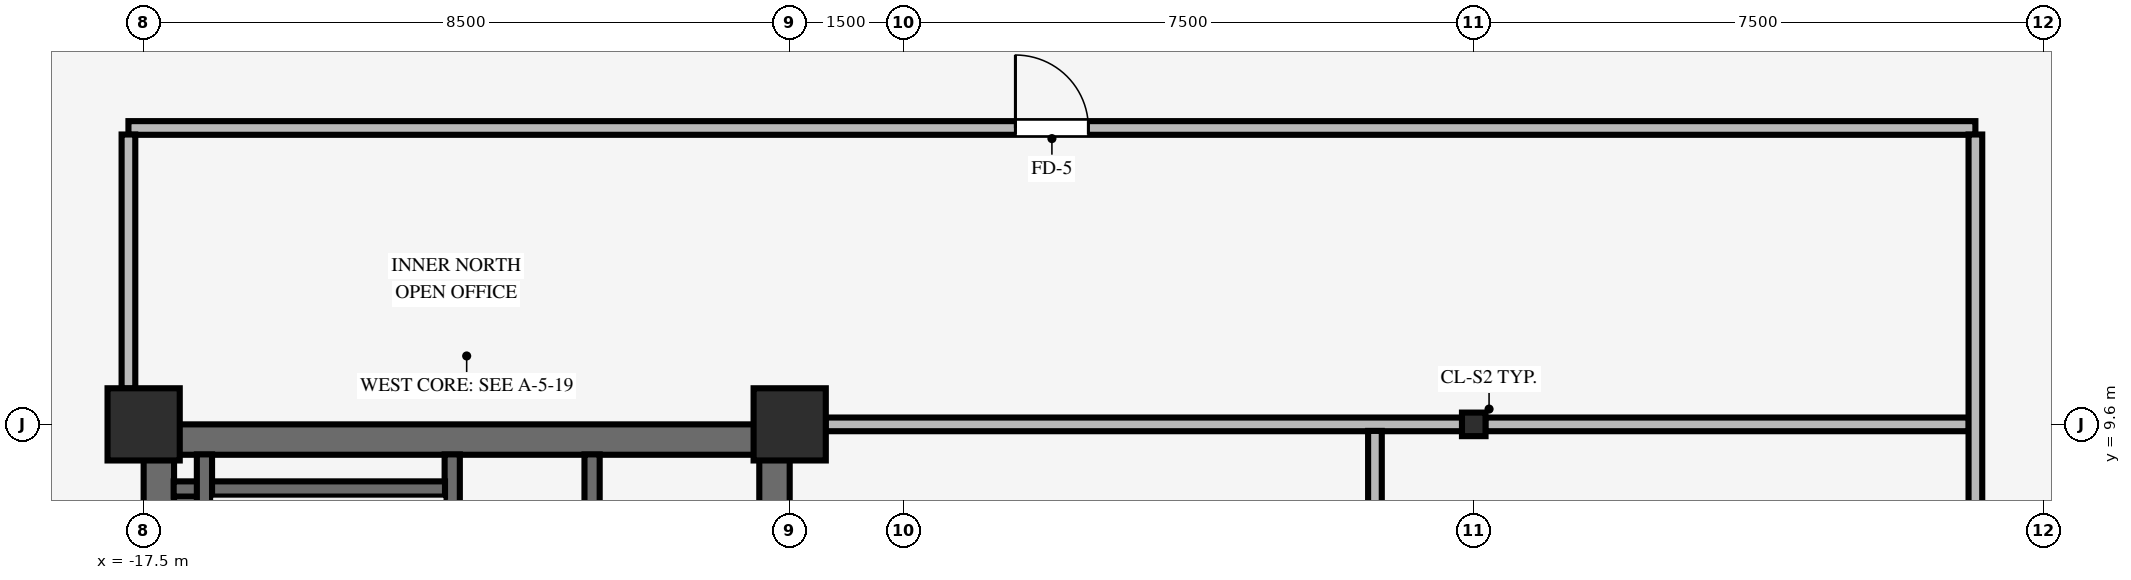
"""IFC4 building model, lengths in metres.
Left out: names, types, materials, properties, quantities, classifications, styles, units other than length and angle.
Written with IfcOpenShell. Run it as: python <this file> out.ifc"""

import sys

from ifc_helpers import new_model, si_unit, direction, frame, frame_2d, origin, origin_2d, place, context, subcontext, project, spatial, rectangle, i_section, extrude, source, transform, mapped, element, fill, save


model = new_model("IFC4")
c1 = context("Model", 3, precision=1e-05, world=origin(), true_north=direction((0.0, 1.0)))
c2 = subcontext(c1, "Body", "Model", "MODEL_VIEW")
j1 = project(units=[si_unit("LENGTHUNIT", "METRE"), si_unit("PLANEANGLEUNIT", "RADIAN")], contexts=[c1])
p1 = place(None, origin())
s1 = spatial("IfcSite", under=j1, at=p1, CompositionType="ELEMENT")
p2 = place(p1, origin())
s2 = spatial("IfcBuilding", under=s1, at=p2, CompositionType="ELEMENT")
p3 = place(p2, frame((0.0, 0.0, 167.65)))
s3 = spatial("IfcBuildingStorey", under=s2, at=p3, CompositionType="ELEMENT", Elevation=167.65)
p4 = place(p3, frame((-17.5, 9.4, 0.0), z_axis=(0.0, 0.0, 1.0), x_axis=(1.0, 0.0, 0.0)))
e1 = element("IfcWall", 1, at=p4, inside=s3, PredefinedType="SHEAR", context=c2, shape_type="SweptSolid", body=[
    extrude(rectangle(XDim=8.5, YDim=0.4, at=frame_2d((4.25, 0.0))), origin(), (0.0, 0.0, 1.0), 3.37),
])
p5 = place(p3, frame((-17.3, -9.205, 0.0), z_axis=(0.0, 0.0, 1.0), x_axis=(0.0, 1.0, 0.0)))
e2 = element("IfcWall", 2, at=p5, inside=s3, PredefinedType="SHEAR", context=c2, shape_type="SweptSolid", body=[
    extrude(rectangle(XDim=18.41, YDim=0.4, at=frame_2d((9.205, 0.0))), origin(), (0.0, 0.0, 1.0), 3.37),
])
p6 = place(p3, frame((-9.2, -9.205, 0.0), z_axis=(0.0, 0.0, 1.0), x_axis=(0.0, 1.0, 0.0)))
e3 = element("IfcWall", 3, at=p6, inside=s3, PredefinedType="SHEAR", context=c2, shape_type="SweptSolid", body=[
    extrude(rectangle(XDim=18.41, YDim=0.4, at=frame_2d((9.205, 0.0))), origin(), (0.0, 0.0, 1.0), 3.37),
])
p7 = place(p6, frame((8.605, 0.0, 0.0)))
e4 = element("IfcOpeningElement", 4, at=p7, cuts=e3, PredefinedType="OPENING", context=c2, shape_type="SweptSolid", body=[
    extrude(rectangle(XDim=1.2, YDim=2.15, at=frame_2d((0.6, 1.075))), frame((0.0, 0.21, 0.0), z_axis=(0.0, -1.0, 0.0), x_axis=(1.0, 0.0, 0.0)), (0.0, 0.0, 1.0), 0.42),
])
for number, where, z_axis, x_axis in (
    (5, (-17.5, 9.6, 0.0), (0.0, 0.0, 1.0), (1.0, 0.0, 0.0)),
    (6, (-9.0, 9.6, 0.0), (0.0, 0.0, 1.0), (1.0, 0.0, 0.0)),
):
    element("IfcColumn", number, at=place(p3, frame(where, z_axis=z_axis, x_axis=x_axis)), inside=s3, PredefinedType="COLUMN", context=c2, shape_type="SweptSolid", body=[
        extrude(rectangle(XDim=0.95, YDim=0.95, at=origin_2d()), origin(), (0.0, 0.0, 1.0), 3.37),
    ])
p8 = place(p3, frame((0.0, 9.6, 0.0), z_axis=(0.0, 0.0, 1.0), x_axis=(1.0, 0.0, 0.0)))
e7 = element("IfcColumn", 7, at=p8, inside=s3, PredefinedType="COLUMN", context=c2, shape_type="SweptSolid", body=[
    extrude(i_section(OverallWidth=0.31, OverallDepth=0.31, WebThickness=0.015, FlangeThickness=0.015, FilletRadius=0.015, at=origin_2d()), origin(), (0.0, 0.0, 1.0), 3.37),
])
p9 = place(p3, frame((-13.44, 0.9, 0.0), z_axis=(0.0, 0.0, 1.0), x_axis=(0.0, 1.0, 0.0)))
e8 = element("IfcWall", 8, at=p9, inside=s3, PredefinedType="SHEAR", context=c2, shape_type="SweptSolid", body=[
    extrude(rectangle(XDim=8.305, YDim=0.2, at=frame_2d((4.153, 0.0))), origin(), (0.0, 0.0, 1.0), 3.37),
])
p10 = place(p9, frame((1.53, 0.0, 0.0), z_axis=(0.0, 0.0, 1.0), x_axis=(-1.0, 0.0, 0.0)))
e9 = element("IfcOpeningElement", 9, at=p10, cuts=e8, PredefinedType="OPENING", context=c2, shape_type="SweptSolid", body=[
    extrude(rectangle(XDim=1.1, YDim=2.15, at=frame_2d((0.55, 1.075))), frame((0.0, 0.11, 0.0), z_axis=(0.0, -1.0, 0.0), x_axis=(1.0, 0.0, 0.0)), (0.0, 0.0, 1.0), 0.22),
])
p11 = place(p3, frame((-17.105, 8.75, 0.0), z_axis=(0.0, 0.0, 1.0), x_axis=(1.0, 0.0, 0.0)))
e10 = element("IfcWall", 10, at=p11, inside=s3, PredefinedType="SHEAR", context=c2, shape_type="SweptSolid", body=[
    extrude(rectangle(XDim=3.57, YDim=0.2, at=frame_2d((1.785, 0.0))), origin(), (0.0, 0.0, 1.0), 3.37),
])
p12 = place(p3, frame((-16.7, 1.095, 0.0), z_axis=(0.0, 0.0, 1.0), x_axis=(0.0, 1.0, 0.0)))
e11 = element("IfcWall", 11, at=p12, inside=s3, PredefinedType="SHEAR", context=c2, shape_type="SweptSolid", body=[
    extrude(rectangle(XDim=8.11, YDim=0.2, at=frame_2d((4.055, 0.0))), origin(), (0.0, 0.0, 1.0), 3.37),
])
p13 = place(p3, frame((-11.6, 1.3, 0.0), z_axis=(0.0, 0.0, 1.0), x_axis=(0.0, 1.0, 0.0)))
e12 = element("IfcWall", 12, at=p13, inside=s3, PredefinedType="SHEAR", context=c2, shape_type="SweptSolid", body=[
    extrude(rectangle(XDim=7.905, YDim=0.2, at=frame_2d((3.953, 0.0))), origin(), (0.0, 0.0, 1.0), 3.37),
])
p14 = place(p3, frame((-8.529, 9.6, 0.0), z_axis=(0.0, 0.0, 1.0), x_axis=(1.0, 0.0, 0.0)))
e13 = element("IfcWall", 13, at=p14, inside=s3, PredefinedType="PARTITIONING", context=c2, shape_type="SweptSolid", body=[
    extrude(rectangle(XDim=8.378, YDim=0.18, at=frame_2d((4.189, 0.0))), origin(), (0.0, 0.0, 1.0), 2.405),
])
p15 = place(p3, frame((0.151, 9.6, 0.0), z_axis=(0.0, 0.0, 1.0), x_axis=(1.0, 0.0, 0.0)))
e14 = element("IfcWall", 14, at=p15, inside=s3, PredefinedType="PARTITIONING", context=c2, shape_type="SweptSolid", body=[
    extrude(rectangle(XDim=6.363, YDim=0.18, at=frame_2d((3.182, 0.0))), origin(), (0.0, 0.0, 1.0), 2.405),
])
p16 = place(p3, frame((-17.7, 13.5, 0.0), z_axis=(0.0, 0.0, 1.0), x_axis=(1.0, 0.0, 0.0)))
e15 = element("IfcWall", 15, at=p16, inside=s3, PredefinedType="PARTITIONING", context=c2, shape_type="SweptSolid", body=[
    extrude(rectangle(XDim=24.3, YDim=0.18, at=frame_2d((12.15, 0.0))), origin(), (0.0, 0.0, 1.0), 3.008),
])
p17 = place(p16, frame((11.67, 0.0, 0.0)))
e16 = element("IfcOpeningElement", 16, at=p17, cuts=e15, PredefinedType="OPENING", context=c2, shape_type="SweptSolid", body=[
    extrude(rectangle(XDim=0.96, YDim=2.1, at=frame_2d((0.48, 1.05))), frame((0.0, 0.1, 0.0), z_axis=(0.0, -1.0, 0.0), x_axis=(1.0, 0.0, 0.0)), (0.0, 0.0, 1.0), 0.2),
])
p18 = place(p3, frame((-17.7, 10.071, 0.0), z_axis=(0.0, 0.0, 1.0), x_axis=(0.0, 1.0, 0.0)))
e17 = element("IfcWall", 17, at=p18, inside=s3, PredefinedType="PARTITIONING", context=c2, shape_type="SweptSolid", body=[
    extrude(rectangle(XDim=3.343, YDim=0.18, at=frame_2d((1.671, 0.0))), origin(), (0.0, 0.0, 1.0), 2.816),
])
p19 = place(p3, frame((-1.3, 1.336, 0.0), z_axis=(0.0, 0.0, 1.0), x_axis=(0.0, 1.0, 0.0)))
e18 = element("IfcWall", 18, at=p19, inside=s3, PredefinedType="PARTITIONING", context=c2, shape_type="SweptSolid", body=[
    extrude(rectangle(XDim=8.178, YDim=0.18, at=frame_2d((4.089, 0.0))), origin(), (0.0, 0.0, 1.0), 3.36),
])
p20 = place(p3, frame((6.6, 1.336, 0.0), z_axis=(0.0, 0.0, 1.0), x_axis=(0.0, 1.0, 0.0)))
e19 = element("IfcWall", 19, at=p20, inside=s3, PredefinedType="PARTITIONING", context=c2, shape_type="SweptSolid", body=[
    extrude(rectangle(XDim=12.078, YDim=0.18, at=frame_2d((6.039, 0.0))), origin(), (0.0, 0.0, 1.0), 3.36),
])
p21 = place(p20, frame((3.652, 0.0, 0.0)))
e20 = element("IfcOpeningElement", 20, at=p21, cuts=e19, PredefinedType="OPENING", context=c2, shape_type="SweptSolid", body=[
    extrude(rectangle(XDim=0.96, YDim=2.1, at=frame_2d((0.48, 1.05))), frame((0.0, 0.1, 0.0), z_axis=(0.0, -1.0, 0.0), x_axis=(1.0, 0.0, 0.0)), (0.0, 0.0, 1.0), 0.2),
])
m1 = source(origin(), c2, "Body", "SweptSolid", [
    extrude(rectangle(XDim=0.96, YDim=2.1, at=frame_2d((0.48, 1.05))), frame((0.0, 0.025, 0.0), z_axis=(0.0, -1.0, 0.0), x_axis=(1.0, 0.0, 0.0)), (0.0, 0.0, 1.0), 0.05),
])
p22 = place(p17, origin())
e21 = element("IfcDoor", 21, at=p22, inside=s3, OperationType="SINGLE_SWING_LEFT", PredefinedType="DOOR", context=c2, shape_type="MappedRepresentation", body=[
    mapped(m1, transform((0.0, 0.0, 0.0), scale=1.0)),
])
fill(e16, e21)
save(model, sys.argv[1])
